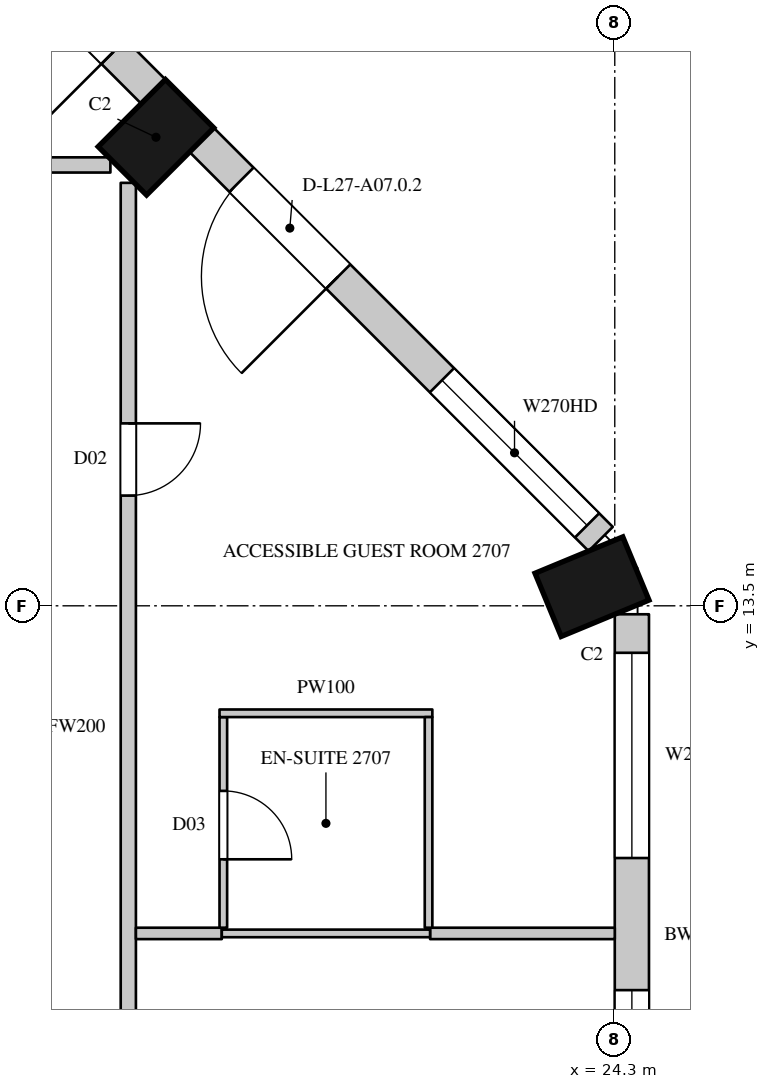
"""IFC4 building model, lengths in metres.
Left out: names, types, materials, properties, quantities, classifications, styles, units other than length and angle.
Written with IfcOpenShell. Run it as: python <this file> out.ifc"""

import sys

from ifc_helpers import new_model, si_unit, direction, frame, frame_2d, origin, origin_2d, place, context, subcontext, project, spatial, rectangle, extrude, element, fill, save


model = new_model("IFC4")
c1 = context("Model", 3, precision=1e-05, world=origin(), true_north=direction((0.0, 1.0)))
c2 = subcontext(c1, "Body", "Model", "MODEL_VIEW")
j1 = project(units=[si_unit("LENGTHUNIT", "METRE"), si_unit("PLANEANGLEUNIT", "RADIAN")], contexts=[c1])
p1 = place(None, origin())
s1 = spatial("IfcSite", under=j1, at=p1, CompositionType="ELEMENT")
p2 = place(p1, origin())
s2 = spatial("IfcBuilding", under=s1, at=p2, CompositionType="ELEMENT")
p3 = place(p2, frame((0.0, 0.0, 127.5)))
s3 = spatial("IfcBuildingStorey", under=s2, at=p3, CompositionType="ELEMENT", Elevation=127.5)
for number, where, z_axis, x_axis in (
    (1, (24.0, 13.752, 0.0), (0.0, 0.0, 1.0), (-0.383, 0.924, 0.0)),
    (2, (18.264, 19.664, 0.0), (0.0, 0.0, 1.0), (-0.707, 0.707, 0.0)),
):
    element("IfcColumn", number, at=place(p3, frame(where, z_axis=z_axis, x_axis=x_axis)), inside=s3, PredefinedType="COLUMN", context=c2, shape_type="SweptSolid", body=[
        extrude(rectangle(XDim=0.9, YDim=1.25, at=origin_2d()), origin(), (0.0, 0.0, 1.0), 3.6),
    ])
p4 = place(p3, frame((24.525, 4.95, 0.0), z_axis=(0.0, 0.0, 1.0), x_axis=(0.0, 1.0, 0.0)))
e3 = element("IfcWall", 3, at=p4, inside=s3, PredefinedType="SOLIDWALL", context=c2, shape_type="SweptSolid", body=[
    extrude(rectangle(XDim=8.439, YDim=0.45, at=frame_2d((4.219, 0.0))), origin(), (0.0, 0.0, 1.0), 3.3),
])
p5 = place(p4, frame((0.294, 0.0, 0.0)))
e4 = element("IfcOpeningElement", 4, at=p5, cuts=e3, PredefinedType="OPENING", context=c2, shape_type="SweptSolid", body=[
    extrude(rectangle(XDim=1.8, YDim=2.4, at=frame_2d((0.9, 1.2))), frame((0.0, 0.235, 0.0), z_axis=(0.0, -1.0, 0.0), x_axis=(1.0, 0.0, 0.0)), (0.0, 0.0, 1.0), 0.47),
])
p6 = place(p4, frame((2.294, 0.0, 1.05)))
e5 = element("IfcOpeningElement", 5, at=p6, cuts=e3, PredefinedType="OPENING", context=c2, shape_type="SweptSolid", body=[
    extrude(rectangle(XDim=1.2, YDim=2.0, at=frame_2d((0.6, 1.0))), frame((0.0, 0.235, 0.0), z_axis=(0.0, -1.0, 0.0), x_axis=(1.0, 0.0, 0.0)), (0.0, 0.0, 1.0), 0.47),
])
p7 = place(p4, frame((5.232, 0.0, 1.05)))
e6 = element("IfcOpeningElement", 6, at=p7, cuts=e3, PredefinedType="OPENING", context=c2, shape_type="SweptSolid", body=[
    extrude(rectangle(XDim=2.7, YDim=2.0, at=frame_2d((1.35, 1.0))), frame((0.0, 0.235, 0.0), z_axis=(0.0, -1.0, 0.0), x_axis=(1.0, 0.0, 0.0)), (0.0, 0.0, 1.0), 0.47),
])
p8 = place(p3, frame((24.115, 14.379, 0.0), z_axis=(0.0, 0.0, 1.0), x_axis=(-0.707106781187, 0.707106781187, 0.0)))
e7 = element("IfcWall", 7, at=p8, inside=s3, PredefinedType="SOLIDWALL", context=c2, shape_type="SweptSolid", body=[
    extrude(rectangle(XDim=7.424, YDim=0.45, at=frame_2d((3.712, 0.0))), origin(), (0.0, 0.0, 1.0), 3.3),
])
p9 = place(p8, frame((0.253, 0.0, 1.05)))
e8 = element("IfcOpeningElement", 8, at=p9, cuts=e7, PredefinedType="OPENING", context=c2, shape_type="SweptSolid", body=[
    extrude(rectangle(XDim=2.7, YDim=2.0, at=frame_2d((1.35, 1.0))), frame((0.0, 0.235, 0.0), z_axis=(0.0, -1.0, 0.0), x_axis=(1.0, 0.0, 0.0)), (0.0, 0.0, 1.0), 0.47),
])
p10 = place(p8, frame((4.884, 0.0, 0.0)))
e9 = element("IfcOpeningElement", 9, at=p10, cuts=e7, PredefinedType="OPENING", context=c2, shape_type="SweptSolid", body=[
    extrude(rectangle(XDim=1.8, YDim=2.4, at=frame_2d((0.9, 1.2))), frame((0.0, 0.235, 0.0), z_axis=(0.0, -1.0, 0.0), x_axis=(1.0, 0.0, 0.0)), (0.0, 0.0, 1.0), 0.47),
])
p11 = place(p3, frame((18.229, 20.265, 0.0), z_axis=(0.0, 0.0, 1.0), x_axis=(-0.707106781187, 0.707106781187, 0.0)))
e10 = element("IfcWall", 10, at=p11, inside=s3, PredefinedType="SOLIDWALL", context=c2, shape_type="SweptSolid", body=[
    extrude(rectangle(XDim=7.424, YDim=0.45, at=frame_2d((3.712, 0.0))), origin(), (0.0, 0.0, 1.0), 3.3),
])
p12 = place(p11, frame((0.74, 0.0, 0.0)))
e11 = element("IfcOpeningElement", 11, at=p12, cuts=e10, PredefinedType="OPENING", context=c2, shape_type="SweptSolid", body=[
    extrude(rectangle(XDim=1.8, YDim=2.4, at=frame_2d((0.9, 1.2))), frame((0.0, 0.235, 0.0), z_axis=(0.0, -1.0, 0.0), x_axis=(1.0, 0.0, 0.0)), (0.0, 0.0, 1.0), 0.47),
])
p13 = place(p11, frame((4.471, 0.0, 1.05)))
e12 = element("IfcOpeningElement", 12, at=p13, cuts=e10, PredefinedType="OPENING", context=c2, shape_type="SweptSolid", body=[
    extrude(rectangle(XDim=2.7, YDim=2.0, at=frame_2d((1.35, 1.0))), frame((0.0, 0.235, 0.0), z_axis=(0.0, -1.0, 0.0), x_axis=(1.0, 0.0, 0.0)), (0.0, 0.0, 1.0), 0.47),
])
p14 = place(p3, frame((23.15, 16.864, 0.0), z_axis=(0.0, 0.0, 1.0), x_axis=(-0.707106781187, 0.707106781187, 0.0)))
e13 = element("IfcWall", 13, at=p14, inside=s3, PredefinedType="SOLIDWALL", context=c2, shape_type="SweptSolid", body=[
    extrude(rectangle(XDim=1.445, YDim=0.45, at=frame_2d((0.722, 0.0))), origin(), (0.0, 0.0, 1.0), 0.6),
])
p15 = place(p3, frame((19.937, 20.078, 0.0), z_axis=(0.0, 0.0, 1.0), x_axis=(-0.707106781187, 0.707106781187, 0.0)))
e14 = element("IfcWall", 14, at=p15, inside=s3, PredefinedType="SOLIDWALL", context=c2, shape_type="SweptSolid", body=[
    extrude(rectangle(XDim=1.781, YDim=0.45, at=frame_2d((0.89, 0.0))), origin(), (0.0, 0.0, 1.0), 0.6),
])
p16 = place(p3, frame((-20.8, 19.3, 0.0), z_axis=(0.0, 0.0, 1.0), x_axis=(1.0, 0.0, 0.0)))
e15 = element("IfcWall", 15, at=p16, inside=s3, PredefinedType="PARTITIONING", context=c2, shape_type="SweptSolid", body=[
    extrude(rectangle(XDim=38.464, YDim=0.2, at=frame_2d((19.232, 0.0))), origin(), (0.0, 0.0, 1.0), 3.3),
])
p17 = place(p16, frame((24.05, 0.0, 0.0)))
e16 = element("IfcOpeningElement", 16, at=p17, cuts=e15, PredefinedType="OPENING", context=c2, shape_type="SweptSolid", body=[
    extrude(rectangle(XDim=0.9, YDim=2.2, at=frame_2d((0.45, 1.1))), frame((0.0, 0.11, 0.0), z_axis=(0.0, -1.0, 0.0), x_axis=(1.0, 0.0, 0.0)), (0.0, 0.0, 1.0), 0.22),
])
p18 = place(p16, frame((11.2, 0.0, 0.0)))
e17 = element("IfcOpeningElement", 17, at=p18, cuts=e15, PredefinedType="OPENING", context=c2, shape_type="SweptSolid", body=[
    extrude(rectangle(XDim=0.95, YDim=2.2, at=frame_2d((0.475, 1.1))), frame((0.0, 0.11, 0.0), z_axis=(0.0, -1.0, 0.0), x_axis=(1.0, 0.0, 0.0)), (0.0, 0.0, 1.0), 0.22),
])
p19 = place(p16, frame((15.05, 0.0, 0.0)))
e18 = element("IfcOpeningElement", 18, at=p19, cuts=e15, PredefinedType="OPENING", context=c2, shape_type="SweptSolid", body=[
    extrude(rectangle(XDim=0.95, YDim=2.2, at=frame_2d((0.475, 1.1))), frame((0.0, 0.11, 0.0), z_axis=(0.0, -1.0, 0.0), x_axis=(1.0, 0.0, 0.0)), (0.0, 0.0, 1.0), 0.22),
])
p20 = place(p16, frame((32.0, 0.0, 0.0)))
e19 = element("IfcOpeningElement", 19, at=p20, cuts=e15, PredefinedType="OPENING", context=c2, shape_type="SweptSolid", body=[
    extrude(rectangle(XDim=0.95, YDim=2.2, at=frame_2d((0.475, 1.1))), frame((0.0, 0.11, 0.0), z_axis=(0.0, -1.0, 0.0), x_axis=(1.0, 0.0, 0.0)), (0.0, 0.0, 1.0), 0.22),
])
p21 = place(p3, frame((17.9, 4.75, 0.0), z_axis=(0.0, 0.0, 1.0), x_axis=(0.0, 1.0, 0.0)))
e20 = element("IfcWall", 20, at=p21, inside=s3, PredefinedType="PARTITIONING", context=c2, shape_type="SweptSolid", body=[
    extrude(rectangle(XDim=14.314, YDim=0.2, at=frame_2d((7.157, 0.0))), origin(), (0.0, 0.0, 1.0), 3.3),
])
p22 = place(p21, frame((1.7, 0.0, 0.0)))
e21 = element("IfcOpeningElement", 21, at=p22, cuts=e20, PredefinedType="OPENING", context=c2, shape_type="SweptSolid", body=[
    extrude(rectangle(XDim=0.9, YDim=2.2, at=frame_2d((0.45, 1.1))), frame((0.0, 0.11, 0.0), z_axis=(0.0, -1.0, 0.0), x_axis=(1.0, 0.0, 0.0)), (0.0, 0.0, 1.0), 0.22),
])
p23 = place(p21, frame((10.2, 0.0, 0.0)))
e22 = element("IfcOpeningElement", 22, at=p23, cuts=e20, PredefinedType="OPENING", context=c2, shape_type="SweptSolid", body=[
    extrude(rectangle(XDim=0.95, YDim=2.2, at=frame_2d((0.475, 1.1))), frame((0.0, 0.11, 0.0), z_axis=(0.0, -1.0, 0.0), x_axis=(1.0, 0.0, 0.0)), (0.0, 0.0, 1.0), 0.22),
])
p24 = place(p3, frame((18.0, 9.19, 0.0), z_axis=(0.0, 0.0, 1.0), x_axis=(1.0, 0.0, 0.0)))
e23 = element("IfcWall", 23, at=p24, inside=s3, PredefinedType="PARTITIONING", context=c2, shape_type="SweptSolid", body=[
    extrude(rectangle(XDim=1.13, YDim=0.15, at=frame_2d((0.565, 0.0))), origin(), (0.0, 0.0, 1.0), 2.65),
])
p25 = place(p3, frame((21.87, 9.19, 0.0), z_axis=(0.0, 0.0, 1.0), x_axis=(1.0, 0.0, 0.0)))
e24 = element("IfcWall", 24, at=p25, inside=s3, PredefinedType="PARTITIONING", context=c2, shape_type="SweptSolid", body=[
    extrude(rectangle(XDim=2.43, YDim=0.15, at=frame_2d((1.215, 0.0))), origin(), (0.0, 0.0, 1.0), 2.65),
])
p26 = place(p3, frame((19.13, 9.19, 0.0), z_axis=(0.0, 0.0, 1.0), x_axis=(1.0, 0.0, 0.0)))
e25 = element("IfcWall", 25, at=p26, inside=s3, PredefinedType="PARTITIONING", context=c2, shape_type="SweptSolid", body=[
    extrude(rectangle(XDim=2.74, YDim=0.1, at=frame_2d((1.37, 0.0))), origin(), (0.0, 0.0, 1.0), 2.65),
])
p27 = place(p3, frame((19.15, 9.265, 0.0), z_axis=(0.0, 0.0, 1.0), x_axis=(0.0, 1.0, 0.0)))
e26 = element("IfcWall", 26, at=p27, inside=s3, PredefinedType="PARTITIONING", context=c2, shape_type="SweptSolid", body=[
    extrude(rectangle(XDim=2.771, YDim=0.1, at=frame_2d((1.385, 0.0))), origin(), (0.0, 0.0, 1.0), 3.3),
])
p28 = place(p27, frame((0.9, 0.0, 0.0)))
e27 = element("IfcOpeningElement", 27, at=p28, cuts=e26, PredefinedType="OPENING", context=c2, shape_type="SweptSolid", body=[
    extrude(rectangle(XDim=0.9, YDim=2.2, at=frame_2d((0.45, 1.1))), frame((0.0, 0.06, 0.0), z_axis=(0.0, -1.0, 0.0), x_axis=(1.0, 0.0, 0.0)), (0.0, 0.0, 1.0), 0.12),
])
p29 = place(p3, frame((19.1, 12.086, 0.0), z_axis=(0.0, 0.0, 1.0), x_axis=(1.0, 0.0, 0.0)))
e28 = element("IfcWall", 28, at=p29, inside=s3, PredefinedType="PARTITIONING", context=c2, shape_type="SweptSolid", body=[
    extrude(rectangle(XDim=2.8, YDim=0.1, at=frame_2d((1.4, 0.0))), origin(), (0.0, 0.0, 1.0), 3.3),
])
p30 = place(p3, frame((21.85, 9.265, 0.0), z_axis=(0.0, 0.0, 1.0), x_axis=(0.0, 1.0, 0.0)))
e29 = element("IfcWall", 29, at=p30, inside=s3, PredefinedType="PARTITIONING", context=c2, shape_type="SweptSolid", body=[
    extrude(rectangle(XDim=2.771, YDim=0.1, at=frame_2d((1.385, 0.0))), origin(), (0.0, 0.0, 1.0), 3.3),
])
p31 = place(p6, origin())
e30 = element("IfcWindow", 30, at=p31, inside=s3, PartitioningType="SINGLE_PANEL", PredefinedType="WINDOW", context=c2, shape_type="SweptSolid", body=[
    extrude(rectangle(XDim=1.2, YDim=2.0, at=frame_2d((0.6, 1.0))), frame((0.0, 0.135, 0.0), z_axis=(0.0, -1.0, 0.0), x_axis=(1.0, 0.0, 0.0)), (0.0, 0.0, 1.0), 0.06),
])
fill(e5, e30)
p32 = place(p7, origin())
e31 = element("IfcWindow", 31, at=p32, inside=s3, PartitioningType="SINGLE_PANEL", PredefinedType="WINDOW", context=c2, shape_type="SweptSolid", body=[
    extrude(rectangle(XDim=2.7, YDim=2.0, at=frame_2d((1.35, 1.0))), frame((0.0, 0.135, 0.0), z_axis=(0.0, -1.0, 0.0), x_axis=(1.0, 0.0, 0.0)), (0.0, 0.0, 1.0), 0.06),
])
fill(e6, e31)
p33 = place(p9, origin())
e32 = element("IfcWindow", 32, at=p33, inside=s3, PartitioningType="SINGLE_PANEL", PredefinedType="WINDOW", context=c2, shape_type="SweptSolid", body=[
    extrude(rectangle(XDim=2.7, YDim=2.0, at=frame_2d((1.35, 1.0))), frame((0.0, 0.135, 0.0), z_axis=(0.0, -1.0, 0.0), x_axis=(1.0, 0.0, 0.0)), (0.0, 0.0, 1.0), 0.06),
])
fill(e8, e32)
p34 = place(p10, origin())
e33 = element("IfcDoor", 33, at=p34, inside=s3, OperationType="SLIDING_TO_LEFT", PredefinedType="DOOR", context=c2, shape_type="SweptSolid", body=[
    extrude(rectangle(XDim=1.8, YDim=2.4, at=frame_2d((0.9, 1.2))), frame((0.0, 0.13, 0.0), z_axis=(0.0, -1.0, 0.0), x_axis=(1.0, 0.0, 0.0)), (0.0, 0.0, 1.0), 0.05),
])
fill(e9, e33)
p35 = place(p12, origin())
e34 = element("IfcDoor", 34, at=p35, inside=s3, OperationType="SLIDING_TO_LEFT", PredefinedType="DOOR", context=c2, shape_type="SweptSolid", body=[
    extrude(rectangle(XDim=1.8, YDim=2.4, at=frame_2d((0.9, 1.2))), frame((0.0, 0.13, 0.0), z_axis=(0.0, -1.0, 0.0), x_axis=(1.0, 0.0, 0.0)), (0.0, 0.0, 1.0), 0.05),
])
fill(e11, e34)
p36 = place(p23, origin())
e35 = element("IfcDoor", 35, at=p36, inside=s3, OperationType="SINGLE_SWING_LEFT", PredefinedType="DOOR", context=c2, shape_type="SweptSolid", body=[
    extrude(rectangle(XDim=0.95, YDim=2.2, at=frame_2d((0.475, 1.1))), frame((0.0, 0.025, 0.0), z_axis=(0.0, -1.0, 0.0), x_axis=(1.0, 0.0, 0.0)), (0.0, 0.0, 1.0), 0.05),
])
fill(e22, e35)
p37 = place(p28, origin())
e36 = element("IfcDoor", 36, at=p37, inside=s3, OperationType="SINGLE_SWING_RIGHT", PredefinedType="DOOR", context=c2, shape_type="SweptSolid", body=[
    extrude(rectangle(XDim=0.9, YDim=2.2, at=frame_2d((0.45, 1.1))), frame((0.0, 0.025, 0.0), z_axis=(0.0, -1.0, 0.0), x_axis=(1.0, 0.0, 0.0)), (0.0, 0.0, 1.0), 0.05),
])
fill(e27, e36)
save(model, sys.argv[1])
